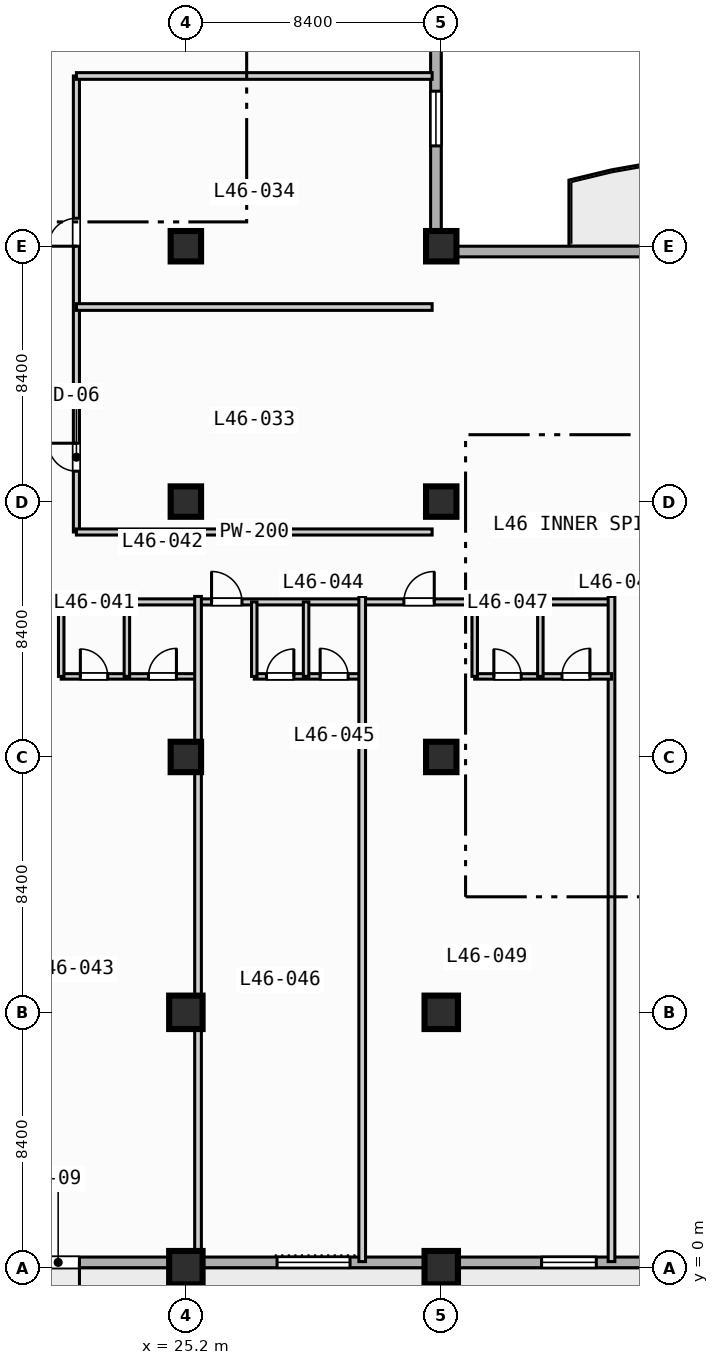
"""IFC4 building model, lengths in metres.
Left out: names, types, materials, properties, quantities, classifications, styles, units other than length and angle.
Written with IfcOpenShell. Run it as: python <this file> out.ifc"""

import sys

from ifc_helpers import new_model, si_unit, direction, frame, frame_2d, origin, origin_2d, place, context, subcontext, project, spatial, rectangle, extrude, element, fill, save


model = new_model("IFC4")
c1 = context("Model", 3, precision=1e-05, world=origin(), true_north=direction((0.0, 1.0)))
c2 = subcontext(c1, "Body", "Model", "MODEL_VIEW")
j1 = project(units=[si_unit("LENGTHUNIT", "METRE"), si_unit("PLANEANGLEUNIT", "RADIAN")], contexts=[c1])
p1 = place(None, origin())
s1 = spatial("IfcSite", under=j1, at=p1, CompositionType="ELEMENT")
p2 = place(p1, origin())
s2 = spatial("IfcBuilding", under=s1, at=p2, CompositionType="ELEMENT")
p3 = place(p2, frame((0.0, 0.0, 190.2)))
s3 = spatial("IfcBuildingStorey", under=s2, at=p3, CompositionType="ELEMENT", Elevation=190.2)
for number, where, z_axis, x_axis in (
    (1, (25.2, 0.0, 0.0), (0.0, 0.0, 1.0), (1.0, 0.0, 0.0)),
    (2, (25.2, 8.4, 0.0), (0.0, 0.0, 1.0), (1.0, 0.0, 0.0)),
):
    element("IfcColumn", number, at=place(p3, frame(where, z_axis=z_axis, x_axis=x_axis)), inside=s3, PredefinedType="COLUMN", context=c2, shape_type="SweptSolid", body=[
        extrude(rectangle(XDim=1.1, YDim=1.1, at=origin_2d()), origin(), (0.0, 0.0, 1.0), 3.7),
    ])
for number, where, z_axis, x_axis in (
    (3, (25.2, 16.8, 0.0), (0.0, 0.0, 1.0), (1.0, 0.0, 0.0)),
    (4, (25.2, 25.2, 0.0), (0.0, 0.0, 1.0), (1.0, 0.0, 0.0)),
    (5, (25.2, 33.6, 0.0), (0.0, 0.0, 1.0), (1.0, 0.0, 0.0)),
):
    element("IfcColumn", number, at=place(p3, frame(where, z_axis=z_axis, x_axis=x_axis)), inside=s3, PredefinedType="COLUMN", context=c2, shape_type="SweptSolid", body=[
        extrude(rectangle(XDim=1.0, YDim=1.0, at=origin_2d()), origin(), (0.0, 0.0, 1.0), 3.7),
    ])
for number, where, z_axis, x_axis in (
    (6, (33.6, 0.0, 0.0), (0.0, 0.0, 1.0), (1.0, 0.0, 0.0)),
    (7, (33.6, 8.4, 0.0), (0.0, 0.0, 1.0), (1.0, 0.0, 0.0)),
):
    element("IfcColumn", number, at=place(p3, frame(where, z_axis=z_axis, x_axis=x_axis)), inside=s3, PredefinedType="COLUMN", context=c2, shape_type="SweptSolid", body=[
        extrude(rectangle(XDim=1.1, YDim=1.1, at=origin_2d()), origin(), (0.0, 0.0, 1.0), 3.7),
    ])
for number, where, z_axis, x_axis in (
    (8, (33.6, 16.8, 0.0), (0.0, 0.0, 1.0), (1.0, 0.0, 0.0)),
    (9, (33.6, 25.2, 0.0), (0.0, 0.0, 1.0), (1.0, 0.0, 0.0)),
    (10, (33.6, 33.6, 0.0), (0.0, 0.0, 1.0), (1.0, 0.0, 0.0)),
):
    element("IfcColumn", number, at=place(p3, frame(where, z_axis=z_axis, x_axis=x_axis)), inside=s3, PredefinedType="COLUMN", context=c2, shape_type="SweptSolid", body=[
        extrude(rectangle(XDim=1.0, YDim=1.0, at=origin_2d()), origin(), (0.0, 0.0, 1.0), 3.7),
    ])
p4 = place(p3, frame((33.425, 72.425, 0.0), z_axis=(0.0, 0.0, 1.0), x_axis=(0.0, -1.0, 0.0)))
e11 = element("IfcWall", 11, at=p4, inside=s3, PredefinedType="STANDARD", context=c2, shape_type="SweptSolid", body=[
    extrude(rectangle(XDim=39.0, YDim=0.35, at=frame_2d((19.5, 0.0))), origin(), (0.0, 0.0, 1.0), 3.47),
])
p5 = place(p4, frame((33.725, 0.0, 0.85)))
e12 = element("IfcOpeningElement", 12, at=p5, cuts=e11, PredefinedType="OPENING", context=c2, shape_type="SweptSolid", body=[
    extrude(rectangle(XDim=1.8, YDim=1.8, at=frame_2d((0.9, 0.9))), frame((0.0, 0.185, 0.0), z_axis=(0.0, -1.0, 0.0), x_axis=(1.0, 0.0, 0.0)), (0.0, 0.0, 1.0), 0.37),
])
p6 = place(p4, frame((16.925, 0.0, 0.85)))
e13 = element("IfcOpeningElement", 13, at=p6, cuts=e11, PredefinedType="OPENING", context=c2, shape_type="SweptSolid", body=[
    extrude(rectangle(XDim=1.8, YDim=1.8, at=frame_2d((0.9, 0.9))), frame((0.0, 0.185, 0.0), z_axis=(0.0, -1.0, 0.0), x_axis=(1.0, 0.0, 0.0)), (0.0, 0.0, 1.0), 0.37),
])
p7 = place(p4, frame((8.225, 0.0, 0.85)))
e14 = element("IfcOpeningElement", 14, at=p7, cuts=e11, PredefinedType="OPENING", context=c2, shape_type="SweptSolid", body=[
    extrude(rectangle(XDim=2.4, YDim=1.95, at=frame_2d((1.2, 0.975))), frame((0.0, 0.185, 0.0), z_axis=(0.0, -1.0, 0.0), x_axis=(1.0, 0.0, 0.0)), (0.0, 0.0, 1.0), 0.37),
])
p8 = place(p3, frame((33.425, 33.425, 0.0), z_axis=(0.0, 0.0, 1.0), x_axis=(1.0, 0.0, 0.0)))
e15 = element("IfcWall", 15, at=p8, inside=s3, PredefinedType="STANDARD", context=c2, shape_type="SweptSolid", body=[
    extrude(rectangle(XDim=39.0, YDim=0.35, at=frame_2d((19.5, 0.0))), origin(), (0.0, 0.0, 1.0), 3.47),
])
p9 = place(p8, frame((12.075, 0.0, 0.0)))
e16 = element("IfcOpeningElement", 16, at=p9, cuts=e15, PredefinedType="OPENING", context=c2, shape_type="SweptSolid", body=[
    extrude(rectangle(XDim=1.4, YDim=2.2, at=frame_2d((0.7, 1.1))), frame((0.0, 0.185, 0.0), z_axis=(0.0, -1.0, 0.0), x_axis=(1.0, 0.0, 0.0)), (0.0, 0.0, 1.0), 0.37),
])
p10 = place(p3, frame((72.425, 0.175, 0.0), z_axis=(0.0, 0.0, 1.0), x_axis=(-1.0, 0.0, 0.0)))
e17 = element("IfcWall", 17, at=p10, inside=s3, PredefinedType="STANDARD", context=c2, shape_type="SweptSolid", body=[
    extrude(rectangle(XDim=69.25, YDim=0.35, at=frame_2d((34.625, 0.0))), origin(), (0.0, 0.0, 1.0), 3.47),
])
p11 = place(p10, frame((50.725, 0.0, 0.0)))
e18 = element("IfcOpeningElement", 18, at=p11, cuts=e17, PredefinedType="OPENING", context=c2, shape_type="SweptSolid", body=[
    extrude(rectangle(XDim=1.4, YDim=2.2, at=frame_2d((0.7, 1.1))), frame((0.0, 0.185, 0.0), z_axis=(0.0, -1.0, 0.0), x_axis=(1.0, 0.0, 0.0)), (0.0, 0.0, 1.0), 0.37),
])
p12 = place(p10, frame((58.625, 0.0, 0.85)))
e19 = element("IfcOpeningElement", 19, at=p12, cuts=e17, PredefinedType="OPENING", context=c2, shape_type="SweptSolid", body=[
    extrude(rectangle(XDim=2.4, YDim=1.95, at=frame_2d((1.2, 0.975))), frame((0.0, 0.185, 0.0), z_axis=(0.0, -1.0, 0.0), x_axis=(1.0, 0.0, 0.0)), (0.0, 0.0, 1.0), 0.37),
])
p13 = place(p10, frame((41.825, 0.0, 0.85)))
e20 = element("IfcOpeningElement", 20, at=p13, cuts=e17, PredefinedType="OPENING", context=c2, shape_type="SweptSolid", body=[
    extrude(rectangle(XDim=2.4, YDim=1.95, at=frame_2d((1.2, 0.975))), frame((0.0, 0.185, 0.0), z_axis=(0.0, -1.0, 0.0), x_axis=(1.0, 0.0, 0.0)), (0.0, 0.0, 1.0), 0.37),
])
p14 = place(p10, frame((33.725, 0.0, 0.85)))
e21 = element("IfcOpeningElement", 21, at=p14, cuts=e17, PredefinedType="OPENING", context=c2, shape_type="SweptSolid", body=[
    extrude(rectangle(XDim=1.8, YDim=1.8, at=frame_2d((0.9, 0.9))), frame((0.0, 0.185, 0.0), z_axis=(0.0, -1.0, 0.0), x_axis=(1.0, 0.0, 0.0)), (0.0, 0.0, 1.0), 0.37),
])
p15 = place(p10, frame((25.025, 0.0, 0.85)))
e22 = element("IfcOpeningElement", 22, at=p15, cuts=e17, PredefinedType="OPENING", context=c2, shape_type="SweptSolid", body=[
    extrude(rectangle(XDim=2.4, YDim=1.95, at=frame_2d((1.2, 0.975))), frame((0.0, 0.185, 0.0), z_axis=(0.0, -1.0, 0.0), x_axis=(1.0, 0.0, 0.0)), (0.0, 0.0, 1.0), 0.37),
])
p16 = place(p10, frame((64.875, 0.0, 0.85)))
e23 = element("IfcOpeningElement", 23, at=p16, cuts=e17, PredefinedType="OPENING", context=c2, shape_type="SweptSolid", body=[
    extrude(rectangle(XDim=1.8, YDim=1.8, at=frame_2d((0.9, 0.9))), frame((0.0, 0.185, 0.0), z_axis=(0.0, -1.0, 0.0), x_axis=(1.0, 0.0, 0.0)), (0.0, 0.0, 1.0), 0.37),
])
p17 = place(p3, frame((21.6, 24.2, 0.0), z_axis=(0.0, 0.0, 1.0), x_axis=(0.0, 1.0, 0.0)))
e24 = element("IfcWall", 24, at=p17, inside=s3, PredefinedType="PARTITIONING", context=c2, shape_type="SweptSolid", body=[
    extrude(rectangle(XDim=15.0, YDim=0.2, at=frame_2d((7.5, 0.0))), origin(), (0.0, 0.0, 1.0), 3.47),
])
p18 = place(p17, frame((2.0, 0.0, 0.0)))
e25 = element("IfcOpeningElement", 25, at=p18, cuts=e24, PredefinedType="OPENING", context=c2, shape_type="SweptSolid", body=[
    extrude(rectangle(XDim=0.92, YDim=2.1, at=frame_2d((0.46, 1.05))), frame((0.0, 0.11, 0.0), z_axis=(0.0, -1.0, 0.0), x_axis=(1.0, 0.0, 0.0)), (0.0, 0.0, 1.0), 0.22),
])
p19 = place(p17, frame((9.4, 0.0, 0.0)))
e26 = element("IfcOpeningElement", 26, at=p19, cuts=e24, PredefinedType="OPENING", context=c2, shape_type="SweptSolid", body=[
    extrude(rectangle(XDim=0.92, YDim=2.1, at=frame_2d((0.46, 1.05))), frame((0.0, 0.11, 0.0), z_axis=(0.0, -1.0, 0.0), x_axis=(1.0, 0.0, 0.0)), (0.0, 0.0, 1.0), 0.22),
])
p20 = place(p3, frame((21.6, 24.2, 0.0), z_axis=(0.0, 0.0, 1.0), x_axis=(1.0, 0.0, 0.0)))
e27 = element("IfcWall", 27, at=p20, inside=s3, PredefinedType="PARTITIONING", context=c2, shape_type="SweptSolid", body=[
    extrude(rectangle(XDim=11.7, YDim=0.2, at=frame_2d((5.85, 0.0))), origin(), (0.0, 0.0, 1.0), 3.47),
])
for number, where, z_axis, x_axis in (
    (28, (21.6, 31.6, 0.0), (0.0, 0.0, 1.0), (1.0, 0.0, 0.0)),
    (29, (21.6, 39.2, 0.0), (0.0, 0.0, 1.0), (1.0, 0.0, 0.0)),
):
    element("IfcWall", number, at=place(p3, frame(where, z_axis=z_axis, x_axis=x_axis)), inside=s3, PredefinedType="PARTITIONING", context=c2, shape_type="SweptSolid", body=[
        extrude(rectangle(XDim=11.7, YDim=0.22, at=frame_2d((5.85, 0.0))), origin(), (0.0, 0.0, 1.0), 3.47),
    ])
p21 = place(p3, frame((3.4, 21.9, 0.0), z_axis=(0.0, 0.0, 1.0), x_axis=(1.0, 0.0, 0.0)))
e30 = element("IfcWall", 30, at=p21, inside=s3, PredefinedType="PARTITIONING", context=c2, shape_type="SweptSolid", body=[
    extrude(rectangle(XDim=35.8, YDim=0.2, at=frame_2d((17.9, 0.0))), origin(), (0.0, 0.0, 1.0), 3.47),
])
p22 = place(p21, frame((0.97, 0.0, 0.0)))
e31 = element("IfcOpeningElement", 31, at=p22, cuts=e30, PredefinedType="OPENING", context=c2, shape_type="SweptSolid", body=[
    extrude(rectangle(XDim=1.0, YDim=2.15, at=frame_2d((0.5, 1.075))), frame((0.0, 0.11, 0.0), z_axis=(0.0, -1.0, 0.0), x_axis=(1.0, 0.0, 0.0)), (0.0, 0.0, 1.0), 0.22),
])
p23 = place(p21, frame((7.97, 0.0, 0.0)))
e32 = element("IfcOpeningElement", 32, at=p23, cuts=e30, PredefinedType="OPENING", context=c2, shape_type="SweptSolid", body=[
    extrude(rectangle(XDim=1.0, YDim=2.15, at=frame_2d((0.5, 1.075))), frame((0.0, 0.11, 0.0), z_axis=(0.0, -1.0, 0.0), x_axis=(1.0, 0.0, 0.0)), (0.0, 0.0, 1.0), 0.22),
])
p24 = place(p21, frame((15.37, 0.0, 0.0)))
e33 = element("IfcOpeningElement", 33, at=p24, cuts=e30, PredefinedType="OPENING", context=c2, shape_type="SweptSolid", body=[
    extrude(rectangle(XDim=1.0, YDim=2.15, at=frame_2d((0.5, 1.075))), frame((0.0, 0.11, 0.0), z_axis=(0.0, -1.0, 0.0), x_axis=(1.0, 0.0, 0.0)), (0.0, 0.0, 1.0), 0.22),
])
p25 = place(p21, frame((22.645, 0.0, 0.0)))
e34 = element("IfcOpeningElement", 34, at=p25, cuts=e30, PredefinedType="OPENING", context=c2, shape_type="SweptSolid", body=[
    extrude(rectangle(XDim=1.0, YDim=2.15, at=frame_2d((0.5, 1.075))), frame((0.0, 0.11, 0.0), z_axis=(0.0, -1.0, 0.0), x_axis=(1.0, 0.0, 0.0)), (0.0, 0.0, 1.0), 0.22),
])
p26 = place(p21, frame((28.97, 0.0, 0.0)))
e35 = element("IfcOpeningElement", 35, at=p26, cuts=e30, PredefinedType="OPENING", context=c2, shape_type="SweptSolid", body=[
    extrude(rectangle(XDim=1.0, YDim=2.15, at=frame_2d((0.5, 1.075))), frame((0.0, 0.11, 0.0), z_axis=(0.0, -1.0, 0.0), x_axis=(1.0, 0.0, 0.0)), (0.0, 0.0, 1.0), 0.22),
])
p27 = place(p3, frame((21.1, 19.45, 0.0), z_axis=(0.0, 0.0, 1.0), x_axis=(1.0, 0.0, 0.0)))
e36 = element("IfcWall", 36, at=p27, inside=s3, PredefinedType="PLUMBINGWALL", context=c2, shape_type="SweptSolid", body=[
    extrude(rectangle(XDim=4.5, YDim=0.18, at=frame_2d((2.25, 0.0))), origin(), (0.0, 0.0, 1.0), 3.47),
])
p28 = place(p27, frame((0.63, 0.0, 0.0)))
e37 = element("IfcOpeningElement", 37, at=p28, cuts=e36, PredefinedType="OPENING", context=c2, shape_type="SweptSolid", body=[
    extrude(rectangle(XDim=0.9, YDim=2.1, at=frame_2d((0.45, 1.05))), frame((0.0, 0.1, 0.0), z_axis=(0.0, -1.0, 0.0), x_axis=(1.0, 0.0, 0.0)), (0.0, 0.0, 1.0), 0.2),
])
p29 = place(p27, frame((2.87, 0.0, 0.0)))
e38 = element("IfcOpeningElement", 38, at=p29, cuts=e36, PredefinedType="OPENING", context=c2, shape_type="SweptSolid", body=[
    extrude(rectangle(XDim=0.92, YDim=2.1, at=frame_2d((0.46, 1.05))), frame((0.0, 0.1, 0.0), z_axis=(0.0, -1.0, 0.0), x_axis=(1.0, 0.0, 0.0)), (0.0, 0.0, 1.0), 0.2),
])
for number, where, z_axis, x_axis in (
    (39, (21.1, 19.45, 0.0), (0.0, 0.0, 1.0), (0.0, 1.0, 0.0)),
    (40, (23.26, 19.45, 0.0), (0.0, 0.0, 1.0), (0.0, 1.0, 0.0)),
):
    element("IfcWall", number, at=place(p3, frame(where, z_axis=z_axis, x_axis=x_axis)), inside=s3, PredefinedType="PLUMBINGWALL", context=c2, shape_type="SweptSolid", body=[
        extrude(rectangle(XDim=2.45, YDim=0.18, at=frame_2d((1.225, 0.0))), origin(), (0.0, 0.0, 1.0), 3.47),
    ])
p30 = place(p3, frame((25.6, 0.2, 0.0), z_axis=(0.0, 0.0, 1.0), x_axis=(0.0, 1.0, 0.0)))
e41 = element("IfcWall", 41, at=p30, inside=s3, PredefinedType="PARTITIONING", context=c2, shape_type="SweptSolid", body=[
    extrude(rectangle(XDim=21.88, YDim=0.22, at=frame_2d((10.94, 0.0))), origin(), (0.0, 0.0, 1.0), 3.47),
])
p31 = place(p3, frame((27.45, 19.45, 0.0), z_axis=(0.0, 0.0, 1.0), x_axis=(1.0, 0.0, 0.0)))
e42 = element("IfcWall", 42, at=p31, inside=s3, PredefinedType="PLUMBINGWALL", context=c2, shape_type="SweptSolid", body=[
    extrude(rectangle(XDim=3.55, YDim=0.18, at=frame_2d((1.775, 0.0))), origin(), (0.0, 0.0, 1.0), 3.47),
])
p32 = place(p31, frame((0.402, 0.0, 0.0)))
e43 = element("IfcOpeningElement", 43, at=p32, cuts=e42, PredefinedType="OPENING", context=c2, shape_type="SweptSolid", body=[
    extrude(rectangle(XDim=0.9, YDim=2.1, at=frame_2d((0.45, 1.05))), frame((0.0, 0.1, 0.0), z_axis=(0.0, -1.0, 0.0), x_axis=(1.0, 0.0, 0.0)), (0.0, 0.0, 1.0), 0.2),
])
p33 = place(p31, frame((2.167, 0.0, 0.0)))
e44 = element("IfcOpeningElement", 44, at=p33, cuts=e42, PredefinedType="OPENING", context=c2, shape_type="SweptSolid", body=[
    extrude(rectangle(XDim=0.92, YDim=2.1, at=frame_2d((0.46, 1.05))), frame((0.0, 0.1, 0.0), z_axis=(0.0, -1.0, 0.0), x_axis=(1.0, 0.0, 0.0)), (0.0, 0.0, 1.0), 0.2),
])
for number, where, z_axis, x_axis in (
    (45, (27.45, 19.45, 0.0), (0.0, 0.0, 1.0), (0.0, 1.0, 0.0)),
    (46, (29.154, 19.45, 0.0), (0.0, 0.0, 1.0), (0.0, 1.0, 0.0)),
):
    element("IfcWall", number, at=place(p3, frame(where, z_axis=z_axis, x_axis=x_axis)), inside=s3, PredefinedType="PLUMBINGWALL", context=c2, shape_type="SweptSolid", body=[
        extrude(rectangle(XDim=2.45, YDim=0.18, at=frame_2d((1.225, 0.0))), origin(), (0.0, 0.0, 1.0), 3.47),
    ])
for number, where, z_axis, x_axis in (
    (47, (31.0, 0.2, 0.0), (0.0, 0.0, 1.0), (0.0, 1.0, 0.0)),
    (48, (39.2, 0.2, 0.0), (0.0, 0.0, 1.0), (0.0, 1.0, 0.0)),
):
    element("IfcWall", number, at=place(p3, frame(where, z_axis=z_axis, x_axis=x_axis)), inside=s3, PredefinedType="PARTITIONING", context=c2, shape_type="SweptSolid", body=[
        extrude(rectangle(XDim=21.88, YDim=0.22, at=frame_2d((10.94, 0.0))), origin(), (0.0, 0.0, 1.0), 3.47),
    ])
p34 = place(p3, frame((34.7, 19.45, 0.0), z_axis=(0.0, 0.0, 1.0), x_axis=(1.0, 0.0, 0.0)))
e49 = element("IfcWall", 49, at=p34, inside=s3, PredefinedType="PLUMBINGWALL", context=c2, shape_type="SweptSolid", body=[
    extrude(rectangle(XDim=4.5, YDim=0.18, at=frame_2d((2.25, 0.0))), origin(), (0.0, 0.0, 1.0), 3.47),
])
p35 = place(p34, frame((0.63, 0.0, 0.0)))
e50 = element("IfcOpeningElement", 50, at=p35, cuts=e49, PredefinedType="OPENING", context=c2, shape_type="SweptSolid", body=[
    extrude(rectangle(XDim=0.9, YDim=2.1, at=frame_2d((0.45, 1.05))), frame((0.0, 0.1, 0.0), z_axis=(0.0, -1.0, 0.0), x_axis=(1.0, 0.0, 0.0)), (0.0, 0.0, 1.0), 0.2),
])
p36 = place(p34, frame((2.87, 0.0, 0.0)))
e51 = element("IfcOpeningElement", 51, at=p36, cuts=e49, PredefinedType="OPENING", context=c2, shape_type="SweptSolid", body=[
    extrude(rectangle(XDim=0.92, YDim=2.1, at=frame_2d((0.46, 1.05))), frame((0.0, 0.1, 0.0), z_axis=(0.0, -1.0, 0.0), x_axis=(1.0, 0.0, 0.0)), (0.0, 0.0, 1.0), 0.2),
])
for number, where, z_axis, x_axis in (
    (52, (34.7, 19.45, 0.0), (0.0, 0.0, 1.0), (0.0, 1.0, 0.0)),
    (53, (36.86, 19.45, 0.0), (0.0, 0.0, 1.0), (0.0, 1.0, 0.0)),
):
    element("IfcWall", number, at=place(p3, frame(where, z_axis=z_axis, x_axis=x_axis)), inside=s3, PredefinedType="PLUMBINGWALL", context=c2, shape_type="SweptSolid", body=[
        extrude(rectangle(XDim=2.45, YDim=0.18, at=frame_2d((1.225, 0.0))), origin(), (0.0, 0.0, 1.0), 3.47),
    ])
p37 = place(p5, origin())
e54 = element("IfcWindow", 54, at=p37, inside=s3, PartitioningType="SINGLE_PANEL", PredefinedType="WINDOW", context=c2, shape_type="SweptSolid", body=[
    extrude(rectangle(XDim=1.8, YDim=1.8, at=frame_2d((0.9, 0.9))), frame((0.0, 0.03, 0.0), z_axis=(0.0, -1.0, 0.0), x_axis=(1.0, 0.0, 0.0)), (0.0, 0.0, 1.0), 0.06),
])
fill(e12, e54)
p38 = place(p11, origin())
e55 = element("IfcDoor", 55, at=p38, inside=s3, OperationType="SINGLE_SWING_LEFT", PredefinedType="DOOR", context=c2, shape_type="SweptSolid", body=[
    extrude(rectangle(XDim=1.4, YDim=2.2, at=frame_2d((0.7, 1.1))), frame((0.0, 0.025, 0.0), z_axis=(0.0, -1.0, 0.0), x_axis=(1.0, 0.0, 0.0)), (0.0, 0.0, 1.0), 0.05),
])
fill(e18, e55)
p39 = place(p13, origin())
e56 = element("IfcWindow", 56, at=p39, inside=s3, PartitioningType="SINGLE_PANEL", PredefinedType="WINDOW", context=c2, shape_type="SweptSolid", body=[
    extrude(rectangle(XDim=2.4, YDim=1.95, at=frame_2d((1.2, 0.975))), frame((0.0, 0.03, 0.0), z_axis=(0.0, -1.0, 0.0), x_axis=(1.0, 0.0, 0.0)), (0.0, 0.0, 1.0), 0.06),
])
fill(e20, e56)
p40 = place(p14, origin())
e57 = element("IfcWindow", 57, at=p40, inside=s3, PartitioningType="SINGLE_PANEL", PredefinedType="WINDOW", context=c2, shape_type="SweptSolid", body=[
    extrude(rectangle(XDim=1.8, YDim=1.8, at=frame_2d((0.9, 0.9))), frame((0.0, 0.03, 0.0), z_axis=(0.0, -1.0, 0.0), x_axis=(1.0, 0.0, 0.0)), (0.0, 0.0, 1.0), 0.06),
])
fill(e21, e57)
p41 = place(p18, origin())
e58 = element("IfcDoor", 58, at=p41, inside=s3, OperationType="SINGLE_SWING_RIGHT", PredefinedType="DOOR", context=c2, shape_type="SweptSolid", body=[
    extrude(rectangle(XDim=0.92, YDim=2.1, at=frame_2d((0.46, 1.05))), frame((0.0, 0.025, 0.0), z_axis=(0.0, -1.0, 0.0), x_axis=(1.0, 0.0, 0.0)), (0.0, 0.0, 1.0), 0.05),
])
fill(e25, e58)
p42 = place(p19, origin())
e59 = element("IfcDoor", 59, at=p42, inside=s3, OperationType="SINGLE_SWING_LEFT", PredefinedType="DOOR", context=c2, shape_type="SweptSolid", body=[
    extrude(rectangle(XDim=0.92, YDim=2.1, at=frame_2d((0.46, 1.05))), frame((0.0, 0.025, 0.0), z_axis=(0.0, -1.0, 0.0), x_axis=(1.0, 0.0, 0.0)), (0.0, 0.0, 1.0), 0.05),
])
fill(e26, e59)
p43 = place(p25, origin())
e60 = element("IfcDoor", 60, at=p43, inside=s3, OperationType="SINGLE_SWING_LEFT", PredefinedType="DOOR", context=c2, shape_type="SweptSolid", body=[
    extrude(rectangle(XDim=1.0, YDim=2.15, at=frame_2d((0.5, 1.075))), frame((0.0, 0.025, 0.0), z_axis=(0.0, -1.0, 0.0), x_axis=(1.0, 0.0, 0.0)), (0.0, 0.0, 1.0), 0.05),
])
fill(e34, e60)
p44 = place(p26, origin())
e61 = element("IfcDoor", 61, at=p44, inside=s3, OperationType="SINGLE_SWING_RIGHT", PredefinedType="DOOR", context=c2, shape_type="SweptSolid", body=[
    extrude(rectangle(XDim=1.0, YDim=2.15, at=frame_2d((0.5, 1.075))), frame((0.0, 0.025, 0.0), z_axis=(0.0, -1.0, 0.0), x_axis=(1.0, 0.0, 0.0)), (0.0, 0.0, 1.0), 0.05),
])
fill(e35, e61)
p45 = place(p28, origin())
e62 = element("IfcDoor", 62, at=p45, inside=s3, OperationType="SINGLE_SWING_LEFT", PredefinedType="DOOR", context=c2, shape_type="SweptSolid", body=[
    extrude(rectangle(XDim=0.9, YDim=2.1, at=frame_2d((0.45, 1.05))), frame((0.0, 0.025, 0.0), z_axis=(0.0, -1.0, 0.0), x_axis=(1.0, 0.0, 0.0)), (0.0, 0.0, 1.0), 0.05),
])
fill(e37, e62)
p46 = place(p29, origin())
e63 = element("IfcDoor", 63, at=p46, inside=s3, OperationType="SINGLE_SWING_RIGHT", PredefinedType="DOOR", context=c2, shape_type="SweptSolid", body=[
    extrude(rectangle(XDim=0.92, YDim=2.1, at=frame_2d((0.46, 1.05))), frame((0.0, 0.025, 0.0), z_axis=(0.0, -1.0, 0.0), x_axis=(1.0, 0.0, 0.0)), (0.0, 0.0, 1.0), 0.05),
])
fill(e38, e63)
p47 = place(p32, origin())
e64 = element("IfcDoor", 64, at=p47, inside=s3, OperationType="SINGLE_SWING_RIGHT", PredefinedType="DOOR", context=c2, shape_type="SweptSolid", body=[
    extrude(rectangle(XDim=0.9, YDim=2.1, at=frame_2d((0.45, 1.05))), frame((0.0, 0.025, 0.0), z_axis=(0.0, -1.0, 0.0), x_axis=(1.0, 0.0, 0.0)), (0.0, 0.0, 1.0), 0.05),
])
fill(e43, e64)
p48 = place(p33, origin())
e65 = element("IfcDoor", 65, at=p48, inside=s3, OperationType="SINGLE_SWING_LEFT", PredefinedType="DOOR", context=c2, shape_type="SweptSolid", body=[
    extrude(rectangle(XDim=0.92, YDim=2.1, at=frame_2d((0.46, 1.05))), frame((0.0, 0.025, 0.0), z_axis=(0.0, -1.0, 0.0), x_axis=(1.0, 0.0, 0.0)), (0.0, 0.0, 1.0), 0.05),
])
fill(e44, e65)
p49 = place(p35, origin())
e66 = element("IfcDoor", 66, at=p49, inside=s3, OperationType="SINGLE_SWING_LEFT", PredefinedType="DOOR", context=c2, shape_type="SweptSolid", body=[
    extrude(rectangle(XDim=0.9, YDim=2.1, at=frame_2d((0.45, 1.05))), frame((0.0, 0.025, 0.0), z_axis=(0.0, -1.0, 0.0), x_axis=(1.0, 0.0, 0.0)), (0.0, 0.0, 1.0), 0.05),
])
fill(e50, e66)
p50 = place(p36, origin())
e67 = element("IfcDoor", 67, at=p50, inside=s3, OperationType="SINGLE_SWING_RIGHT", PredefinedType="DOOR", context=c2, shape_type="SweptSolid", body=[
    extrude(rectangle(XDim=0.92, YDim=2.1, at=frame_2d((0.46, 1.05))), frame((0.0, 0.025, 0.0), z_axis=(0.0, -1.0, 0.0), x_axis=(1.0, 0.0, 0.0)), (0.0, 0.0, 1.0), 0.05),
])
fill(e51, e67)
save(model, sys.argv[1])
